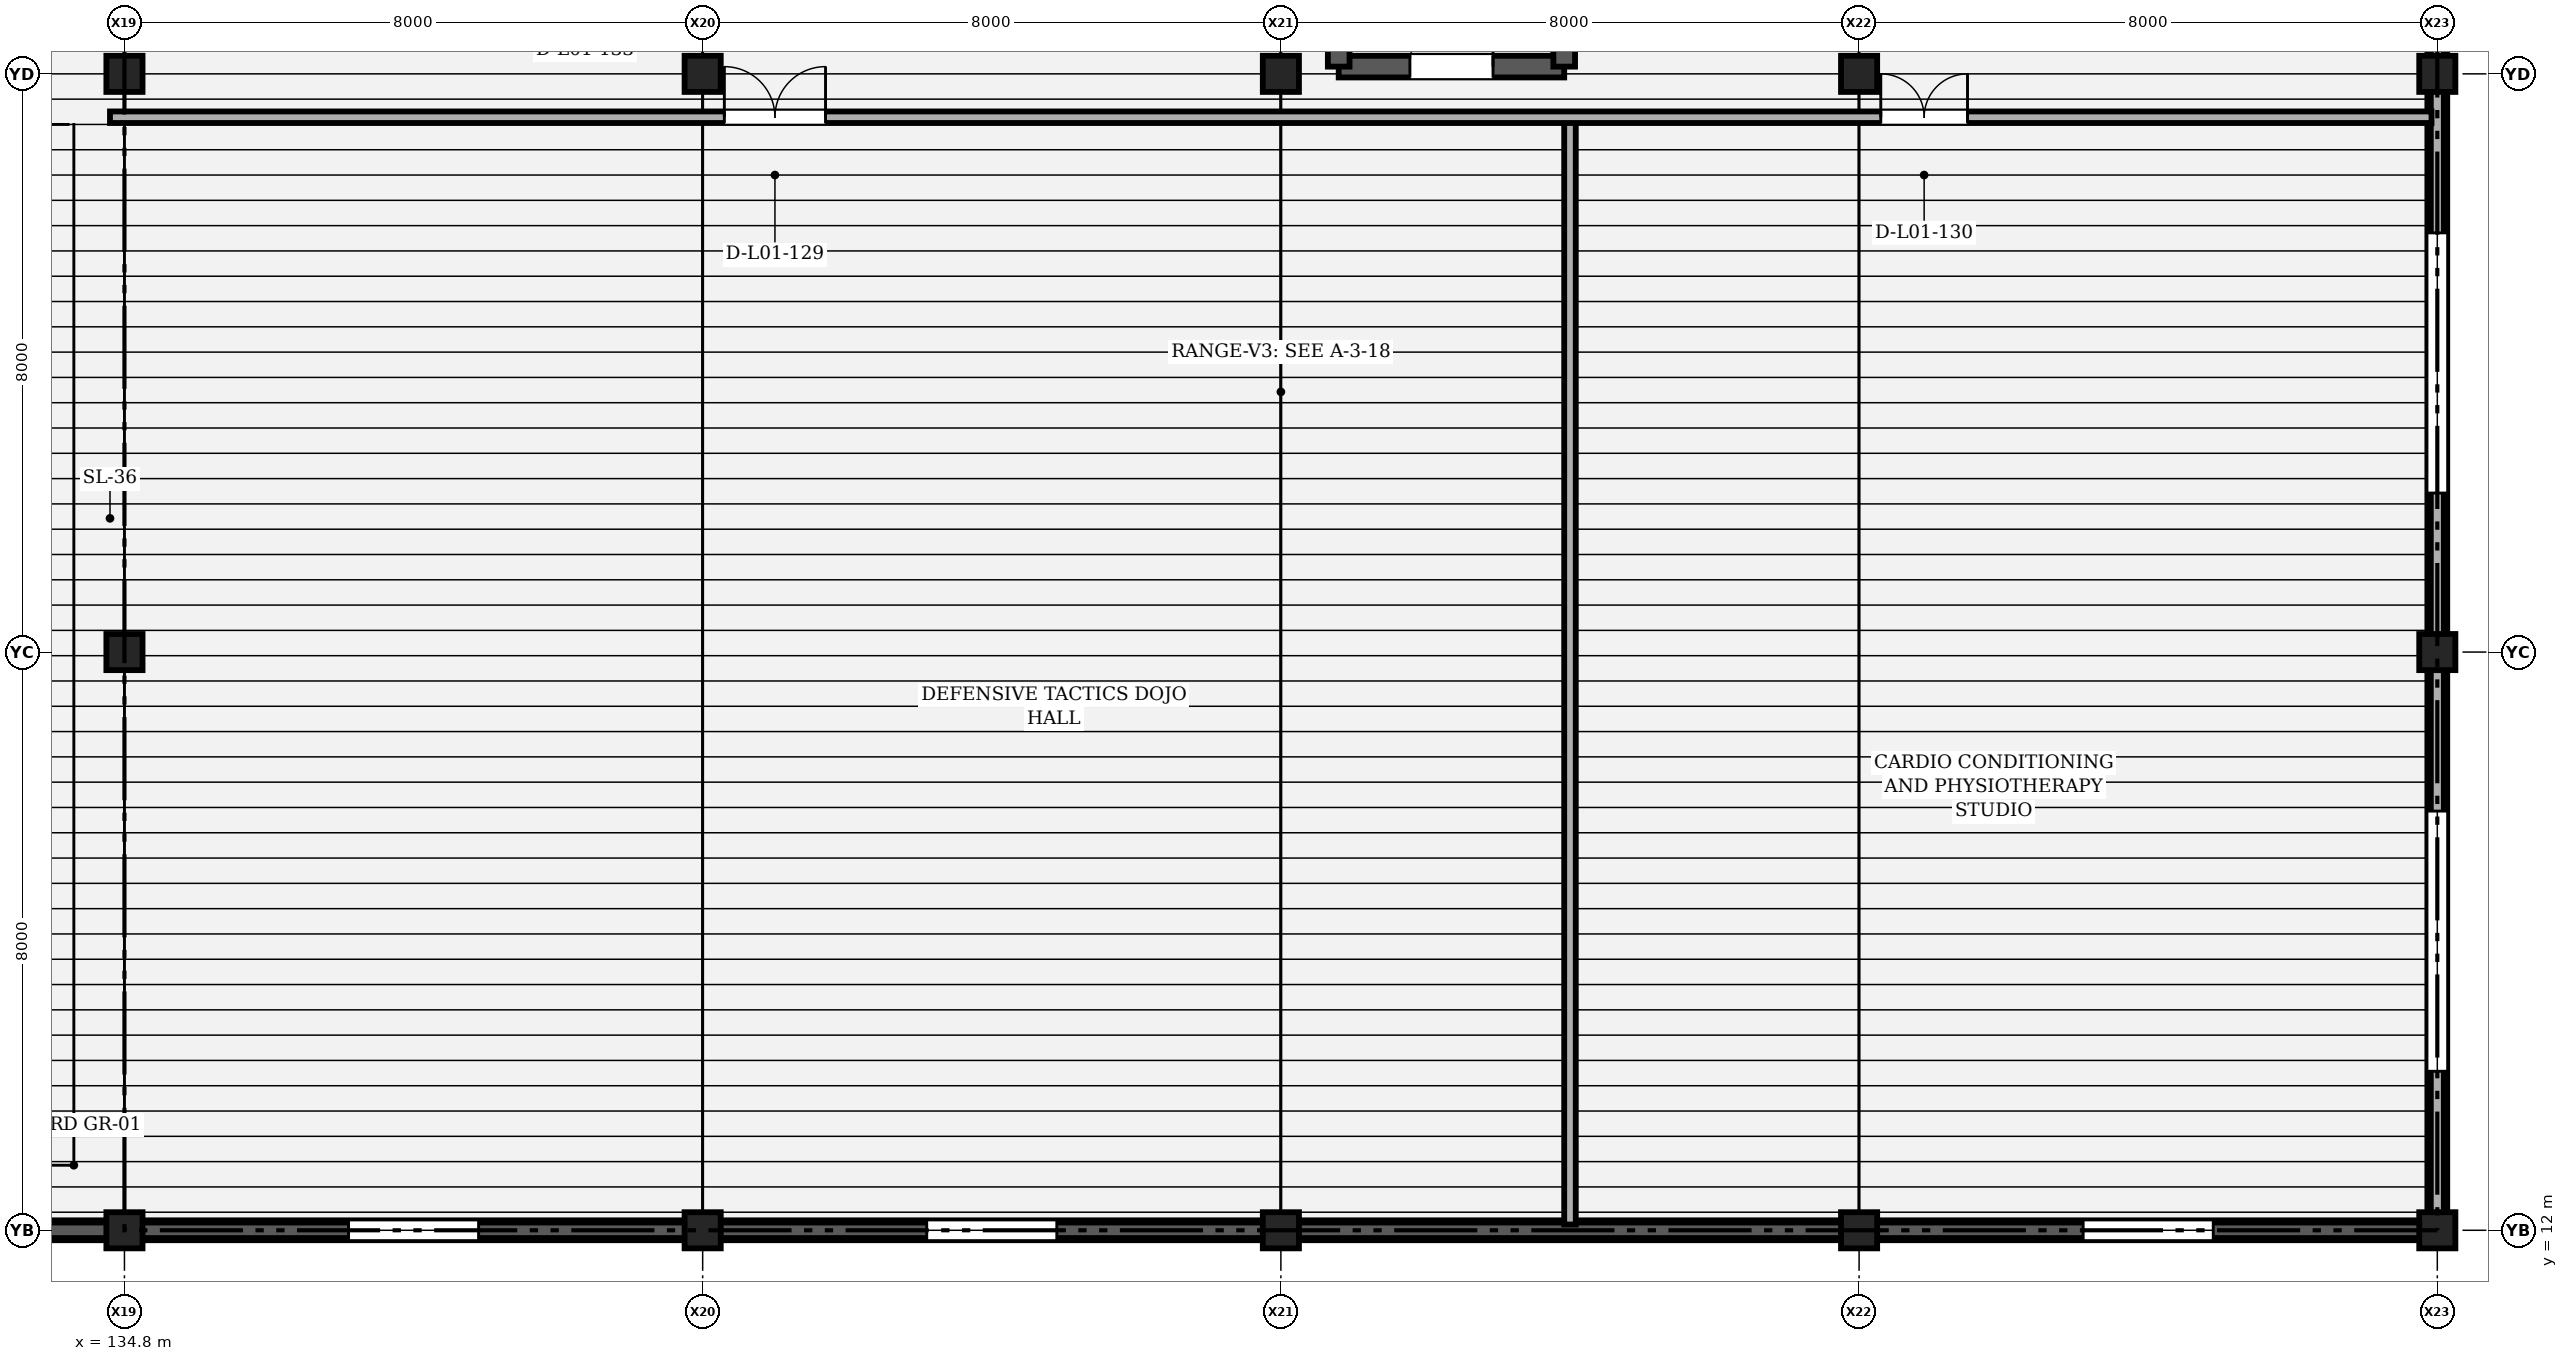
"""IFC4 building model, lengths in metres.
Left out: names, types, materials, properties, quantities, classifications, styles, units other than length and angle.
Written with IfcOpenShell. Run it as: python <this file> out.ifc"""

import sys

from ifc_helpers import new_model, si_unit, direction, frame, frame_2d, origin, origin_2d, place, context, subcontext, project, spatial, polyline, rectangle, outline, extrude, element, fill, save


model = new_model("IFC4")
c1 = context("Model", 3, precision=1e-05, world=origin(), true_north=direction((0.0, 1.0)))
c2 = subcontext(c1, "Body", "Model", "MODEL_VIEW")
j1 = project(units=[si_unit("LENGTHUNIT", "METRE"), si_unit("PLANEANGLEUNIT", "RADIAN")], contexts=[c1])
p1 = place(None, origin())
s1 = spatial("IfcSite", under=j1, at=p1, CompositionType="ELEMENT")
p2 = place(p1, origin())
s2 = spatial("IfcBuilding", under=s1, at=p2, CompositionType="ELEMENT")
p3 = place(p2, frame((0.0, 0.0, 4.8)))
s3 = spatial("IfcBuildingStorey", under=s2, at=p3, CompositionType="ELEMENT", Elevation=4.8)
for number, where, z_axis, x_axis in (
    (1, (134.8, 12.0, 0.0), (0.0, 0.0, 1.0), (1.0, 0.0, 0.0)),
    (2, (134.8, 20.0, 0.0), (0.0, 0.0, 1.0), (1.0, 0.0, 0.0)),
    (3, (134.8, 28.0, 0.0), (0.0, 0.0, 1.0), (1.0, 0.0, 0.0)),
    (4, (142.8, 12.0, 0.0), (0.0, 0.0, 1.0), (1.0, 0.0, 0.0)),
    (5, (142.8, 28.0, 0.0), (0.0, 0.0, 1.0), (1.0, 0.0, 0.0)),
    (6, (150.8, 12.0, 0.0), (0.0, 0.0, 1.0), (1.0, 0.0, 0.0)),
    (7, (150.8, 28.0, 0.0), (0.0, 0.0, 1.0), (1.0, 0.0, 0.0)),
    (8, (158.8, 12.0, 0.0), (0.0, 0.0, 1.0), (1.0, 0.0, 0.0)),
    (9, (158.8, 28.0, 0.0), (0.0, 0.0, 1.0), (1.0, 0.0, 0.0)),
    (10, (166.8, 12.0, 0.0), (0.0, 0.0, 1.0), (1.0, 0.0, 0.0)),
    (11, (166.8, 20.0, 0.0), (0.0, 0.0, 1.0), (1.0, 0.0, 0.0)),
    (12, (166.8, 28.0, 0.0), (0.0, 0.0, 1.0), (1.0, 0.0, 0.0)),
):
    element("IfcColumn", number, at=place(p3, frame(where, z_axis=z_axis, x_axis=x_axis)), inside=s3, PredefinedType="COLUMN", context=c2, shape_type="SweptSolid", body=[
        extrude(rectangle(XDim=0.5, YDim=0.5, at=origin_2d()), origin(), (0.0, 0.0, 1.0), 4.2),
    ])
p4 = place(p3, frame((127.05, 12.0, 0.0), z_axis=(0.0, 0.0, 1.0), x_axis=(1.0, 0.0, 0.0)))
e13 = element("IfcWall", 13, at=p4, inside=s3, PredefinedType="SOLIDWALL", context=c2, shape_type="SweptSolid", body=[
    extrude(rectangle(XDim=7.5, YDim=0.275, at=frame_2d((3.75, 0.0))), origin(), (0.0, 0.0, 1.0), 3.333),
])
p5 = place(p4, frame((2.85, 0.0, 1.6)))
e14 = element("IfcOpeningElement", 14, at=p5, cuts=e13, PredefinedType="OPENING", context=c2, shape_type="SweptSolid", body=[
    extrude(rectangle(XDim=1.8, YDim=0.75, at=frame_2d((0.9, 0.375))), frame((0.0, 0.147, 0.0), z_axis=(0.0, -1.0, 0.0), x_axis=(1.0, 0.0, 0.0)), (0.0, 0.0, 1.0), 0.295),
])
p6 = place(p3, frame((135.05, 12.0, 0.0), z_axis=(0.0, 0.0, 1.0), x_axis=(1.0, 0.0, 0.0)))
e15 = element("IfcWall", 15, at=p6, inside=s3, PredefinedType="SOLIDWALL", context=c2, shape_type="SweptSolid", body=[
    extrude(rectangle(XDim=7.5, YDim=0.275, at=frame_2d((3.75, 0.0))), origin(), (0.0, 0.0, 1.0), 3.333),
])
p7 = place(p6, frame((2.85, 0.0, 1.6)))
e16 = element("IfcOpeningElement", 16, at=p7, cuts=e15, PredefinedType="OPENING", context=c2, shape_type="SweptSolid", body=[
    extrude(rectangle(XDim=1.8, YDim=0.75, at=frame_2d((0.9, 0.375))), frame((0.0, 0.147, 0.0), z_axis=(0.0, -1.0, 0.0), x_axis=(1.0, 0.0, 0.0)), (0.0, 0.0, 1.0), 0.295),
])
p8 = place(p3, frame((143.05, 12.0, 0.0), z_axis=(0.0, 0.0, 1.0), x_axis=(1.0, 0.0, 0.0)))
e17 = element("IfcWall", 17, at=p8, inside=s3, PredefinedType="SOLIDWALL", context=c2, shape_type="SweptSolid", body=[
    extrude(rectangle(XDim=7.5, YDim=0.275, at=frame_2d((3.75, 0.0))), origin(), (0.0, 0.0, 1.0), 3.333),
])
p9 = place(p8, frame((2.85, 0.0, 1.6)))
e18 = element("IfcOpeningElement", 18, at=p9, cuts=e17, PredefinedType="OPENING", context=c2, shape_type="SweptSolid", body=[
    extrude(rectangle(XDim=1.8, YDim=0.75, at=frame_2d((0.9, 0.375))), frame((0.0, 0.147, 0.0), z_axis=(0.0, -1.0, 0.0), x_axis=(1.0, 0.0, 0.0)), (0.0, 0.0, 1.0), 0.295),
])
p10 = place(p3, frame((151.05, 12.0, 0.0), z_axis=(0.0, 0.0, 1.0), x_axis=(1.0, 0.0, 0.0)))
e19 = element("IfcWall", 19, at=p10, inside=s3, PredefinedType="SOLIDWALL", context=c2, shape_type="SweptSolid", body=[
    extrude(rectangle(XDim=7.5, YDim=0.275, at=frame_2d((3.75, 0.0))), origin(), (0.0, 0.0, 1.0), 3.333),
])
p11 = place(p3, frame((159.05, 12.0, 0.0), z_axis=(0.0, 0.0, 1.0), x_axis=(1.0, 0.0, 0.0)))
e20 = element("IfcWall", 20, at=p11, inside=s3, PredefinedType="SOLIDWALL", context=c2, shape_type="SweptSolid", body=[
    extrude(rectangle(XDim=7.5, YDim=0.275, at=frame_2d((3.75, 0.0))), origin(), (0.0, 0.0, 1.0), 3.333),
])
p12 = place(p11, frame((2.85, 0.0, 1.6)))
e21 = element("IfcOpeningElement", 21, at=p12, cuts=e20, PredefinedType="OPENING", context=c2, shape_type="SweptSolid", body=[
    extrude(rectangle(XDim=1.8, YDim=0.75, at=frame_2d((0.9, 0.375))), frame((0.0, 0.147, 0.0), z_axis=(0.0, -1.0, 0.0), x_axis=(1.0, 0.0, 0.0)), (0.0, 0.0, 1.0), 0.295),
])
p13 = place(p3, frame((166.8, 12.25, 0.0), z_axis=(0.0, 0.0, 1.0), x_axis=(0.0, 1.0, 0.0)))
e22 = element("IfcWall", 22, at=p13, inside=s3, PredefinedType="SOLIDWALL", context=c2, shape_type="SweptSolid", body=[
    extrude(rectangle(XDim=7.5, YDim=0.275, at=frame_2d((3.75, 0.0))), origin(), (0.0, 0.0, 1.0), 3.488),
])
p14 = place(p13, frame((1.95, 0.0, 2.05)))
e23 = element("IfcOpeningElement", 23, at=p14, cuts=e22, PredefinedType="OPENING", context=c2, shape_type="SweptSolid", body=[
    extrude(rectangle(XDim=3.6, YDim=1.2, at=frame_2d((1.8, 0.6))), frame((0.0, 0.147, 0.0), z_axis=(0.0, -1.0, 0.0), x_axis=(1.0, 0.0, 0.0)), (0.0, 0.0, 1.0), 0.295),
])
p15 = place(p3, frame((166.8, 20.25, 0.0), z_axis=(0.0, 0.0, 1.0), x_axis=(0.0, 1.0, 0.0)))
e24 = element("IfcWall", 24, at=p15, inside=s3, PredefinedType="SOLIDWALL", context=c2, shape_type="SweptSolid", body=[
    extrude(rectangle(XDim=7.5, YDim=0.275, at=frame_2d((3.75, 0.0))), origin(), (0.0, 0.0, 1.0), 3.488),
])
p16 = place(p15, frame((1.95, 0.0, 2.05)))
e25 = element("IfcOpeningElement", 25, at=p16, cuts=e24, PredefinedType="OPENING", context=c2, shape_type="SweptSolid", body=[
    extrude(rectangle(XDim=3.6, YDim=1.2, at=frame_2d((1.8, 0.6))), frame((0.0, 0.147, 0.0), z_axis=(0.0, -1.0, 0.0), x_axis=(1.0, 0.0, 0.0)), (0.0, 0.0, 1.0), 0.295),
])
p17 = place(p3, frame((166.8, 28.25, 0.0), z_axis=(0.0, 0.0, 1.0), x_axis=(0.0, 1.0, 0.0)))
e26 = element("IfcWall", 26, at=p17, inside=s3, PredefinedType="SOLIDWALL", context=c2, shape_type="SweptSolid", body=[
    extrude(rectangle(XDim=6.7, YDim=0.275, at=frame_2d((3.35, 0.0))), origin(), (0.0, 0.0, 1.0), 3.488),
])
p18 = place(p17, frame((1.55, 0.0, 2.05)))
e27 = element("IfcOpeningElement", 27, at=p18, cuts=e26, PredefinedType="OPENING", context=c2, shape_type="SweptSolid", body=[
    extrude(rectangle(XDim=3.6, YDim=1.2, at=frame_2d((1.8, 0.6))), frame((0.0, 0.147, 0.0), z_axis=(0.0, -1.0, 0.0), x_axis=(1.0, 0.0, 0.0)), (0.0, 0.0, 1.0), 0.295),
])
for number, where, z_axis, x_axis in (
    (28, (118.8, 12.0, 4.2), (0.0, 0.0, 1.0), (1.0, 0.0, 0.0)),
    (29, (134.8, 12.0, 4.2), (0.0, 0.0, 1.0), (1.0, 0.0, 0.0)),
    (30, (150.8, 12.0, 4.2), (0.0, 0.0, 1.0), (1.0, 0.0, 0.0)),
):
    element("IfcWall", number, at=place(p3, frame(where, z_axis=z_axis, x_axis=x_axis)), inside=s3, PredefinedType="SOLIDWALL", context=c2, shape_type="SweptSolid", body=[
        extrude(outline(polyline([(0.0, 0.0), (16.0, 0.0), (16.0, 0.05), (8.0, 3.55), (0.0, 0.05), (0.0, 0.0)])), frame((0.0, 0.107, 0.0), z_axis=(0.0, -1.0, 0.0), x_axis=(1.0, 0.0, 0.0)), (0.0, 0.0, 1.0), 0.215),
    ])
p19 = place(p3, frame((166.8, 12.0, 4.2), z_axis=(0.0, 0.0, 1.0), x_axis=(0.0, 1.0, 0.0)))
e31 = element("IfcWall", 31, at=p19, inside=s3, PredefinedType="PARAPET", context=c2, shape_type="SweptSolid", body=[
    extrude(rectangle(XDim=23.2, YDim=0.18, at=frame_2d((11.6, 0.0))), origin(), (0.0, 0.0, 1.0), 0.85),
])
p20 = place(p3, frame((151.6, 28.1, 0.0), z_axis=(0.0, 0.0, 1.0), x_axis=(1.0, 0.0, 0.0)))
e32 = element("IfcWall", 32, at=p20, inside=s3, PredefinedType="SHEAR", context=c2, shape_type="SweptSolid", body=[
    extrude(rectangle(XDim=3.12, YDim=0.3, at=frame_2d((1.56, 0.0))), origin(), (0.0, 0.0, 1.0), 4.2),
])
p21 = place(p20, frame((0.985, 0.0, 0.0)))
e33 = element("IfcOpeningElement", 33, at=p21, cuts=e32, PredefinedType="OPENING", context=c2, shape_type="SweptSolid", body=[
    extrude(rectangle(XDim=1.15, YDim=2.15, at=frame_2d((0.575, 1.075))), frame((0.0, 0.16, 0.0), z_axis=(0.0, -1.0, 0.0), x_axis=(1.0, 0.0, 0.0)), (0.0, 0.0, 1.0), 0.32),
])
for number, where, z_axis, x_axis in (
    (34, (154.72, 28.1, 0.0), (0.0, 0.0, 1.0), (0.0, 1.0, 0.0)),
    (35, (151.6, 35.2, 0.0), (0.0, 0.0, 1.0), (0.0, -1.0, 0.0)),
):
    element("IfcWall", number, at=place(p3, frame(where, z_axis=z_axis, x_axis=x_axis)), inside=s3, PredefinedType="SHEAR", context=c2, shape_type="SweptSolid", body=[
        extrude(rectangle(XDim=7.1, YDim=0.3, at=frame_2d((3.55, 0.0))), origin(), (0.0, 0.0, 1.0), 4.2),
    ])
p22 = place(p3, frame((154.8, 12.08, 0.0), z_axis=(0.0, 0.0, 1.0), x_axis=(0.0, 1.0, 0.0)))
e36 = element("IfcWall", 36, at=p22, inside=s3, PredefinedType="PARTITIONING", context=c2, shape_type="SweptSolid", body=[
    extrude(rectangle(XDim=15.32, YDim=0.16, at=frame_2d((7.66, 0.0))), origin(), (0.0, 0.0, 1.0), 3.91),
])
p23 = place(p3, frame((134.6, 27.4, 0.0), z_axis=(0.0, 0.0, 1.0), x_axis=(1.0, 0.0, 0.0)))
e37 = element("IfcWall", 37, at=p23, inside=s3, PredefinedType="PARTITIONING", context=c2, shape_type="SweptSolid", body=[
    extrude(rectangle(XDim=32.12, YDim=0.16, at=frame_2d((16.06, 0.0))), origin(), (0.0, 0.0, 1.0), 3.229),
])
p24 = place(p23, frame((8.5, 0.0, 0.0)))
e38 = element("IfcOpeningElement", 38, at=p24, cuts=e37, PredefinedType="OPENING", context=c2, shape_type="SweptSolid", body=[
    extrude(rectangle(XDim=1.4, YDim=2.15, at=frame_2d((0.7, 1.075))), frame((0.0, 0.09, 0.0), z_axis=(0.0, -1.0, 0.0), x_axis=(1.0, 0.0, 0.0)), (0.0, 0.0, 1.0), 0.18),
])
p25 = place(p23, frame((24.5, 0.0, 0.0)))
e39 = element("IfcOpeningElement", 39, at=p25, cuts=e37, PredefinedType="OPENING", context=c2, shape_type="SweptSolid", body=[
    extrude(rectangle(XDim=1.2, YDim=2.2, at=frame_2d((0.6, 1.1))), frame((0.0, 0.09, 0.0), z_axis=(0.0, -1.0, 0.0), x_axis=(1.0, 0.0, 0.0)), (0.0, 0.0, 1.0), 0.18),
])
p26 = place(p7, origin())
e40 = element("IfcWindow", 40, at=p26, inside=s3, PartitioningType="SINGLE_PANEL", PredefinedType="WINDOW", context=c2, shape_type="SweptSolid", body=[
    extrude(rectangle(XDim=1.8, YDim=0.75, at=frame_2d((0.9, 0.375))), frame((0.0, 0.03, 0.0), z_axis=(0.0, -1.0, 0.0), x_axis=(1.0, 0.0, 0.0)), (0.0, 0.0, 1.0), 0.06),
])
fill(e16, e40)
p27 = place(p9, origin())
e41 = element("IfcWindow", 41, at=p27, inside=s3, PartitioningType="SINGLE_PANEL", PredefinedType="WINDOW", context=c2, shape_type="SweptSolid", body=[
    extrude(rectangle(XDim=1.8, YDim=0.75, at=frame_2d((0.9, 0.375))), frame((0.0, 0.03, 0.0), z_axis=(0.0, -1.0, 0.0), x_axis=(1.0, 0.0, 0.0)), (0.0, 0.0, 1.0), 0.06),
])
fill(e18, e41)
p28 = place(p12, origin())
e42 = element("IfcWindow", 42, at=p28, inside=s3, PartitioningType="SINGLE_PANEL", PredefinedType="WINDOW", context=c2, shape_type="SweptSolid", body=[
    extrude(rectangle(XDim=1.8, YDim=0.75, at=frame_2d((0.9, 0.375))), frame((0.0, 0.03, 0.0), z_axis=(0.0, -1.0, 0.0), x_axis=(1.0, 0.0, 0.0)), (0.0, 0.0, 1.0), 0.06),
])
fill(e21, e42)
p29 = place(p14, origin())
e43 = element("IfcWindow", 43, at=p29, inside=s3, PartitioningType="SINGLE_PANEL", PredefinedType="WINDOW", context=c2, shape_type="SweptSolid", body=[
    extrude(rectangle(XDim=3.6, YDim=1.2, at=frame_2d((1.8, 0.6))), frame((0.0, 0.03, 0.0), z_axis=(0.0, -1.0, 0.0), x_axis=(1.0, 0.0, 0.0)), (0.0, 0.0, 1.0), 0.06),
])
fill(e23, e43)
p30 = place(p16, origin())
e44 = element("IfcWindow", 44, at=p30, inside=s3, PartitioningType="SINGLE_PANEL", PredefinedType="WINDOW", context=c2, shape_type="SweptSolid", body=[
    extrude(rectangle(XDim=3.6, YDim=1.2, at=frame_2d((1.8, 0.6))), frame((0.0, 0.03, 0.0), z_axis=(0.0, -1.0, 0.0), x_axis=(1.0, 0.0, 0.0)), (0.0, 0.0, 1.0), 0.06),
])
fill(e25, e44)
p31 = place(p21, origin())
e45 = element("IfcDoor", 45, at=p31, inside=s3, OperationType="SINGLE_SWING_RIGHT", PredefinedType="DOOR", context=c2, shape_type="SweptSolid", body=[
    extrude(rectangle(XDim=1.15, YDim=2.15, at=frame_2d((0.575, 1.075))), frame((0.0, 0.025, 0.0), z_axis=(0.0, -1.0, 0.0), x_axis=(1.0, 0.0, 0.0)), (0.0, 0.0, 1.0), 0.05),
])
fill(e33, e45)
p32 = place(p24, origin())
e46 = element("IfcDoor", 46, at=p32, inside=s3, OperationType="DOUBLE_DOOR_SINGLE_SWING", PredefinedType="DOOR", context=c2, shape_type="SweptSolid", body=[
    extrude(rectangle(XDim=1.4, YDim=2.15, at=frame_2d((0.7, 1.075))), frame((0.0, 0.025, 0.0), z_axis=(0.0, -1.0, 0.0), x_axis=(1.0, 0.0, 0.0)), (0.0, 0.0, 1.0), 0.05),
])
fill(e38, e46)
p33 = place(p25, origin())
e47 = element("IfcDoor", 47, at=p33, inside=s3, OperationType="DOUBLE_DOOR_SINGLE_SWING", PredefinedType="DOOR", context=c2, shape_type="SweptSolid", body=[
    extrude(rectangle(XDim=1.2, YDim=2.2, at=frame_2d((0.6, 1.1))), frame((0.0, 0.025, 0.0), z_axis=(0.0, -1.0, 0.0), x_axis=(1.0, 0.0, 0.0)), (0.0, 0.0, 1.0), 0.05),
])
fill(e39, e47)
save(model, sys.argv[1])
